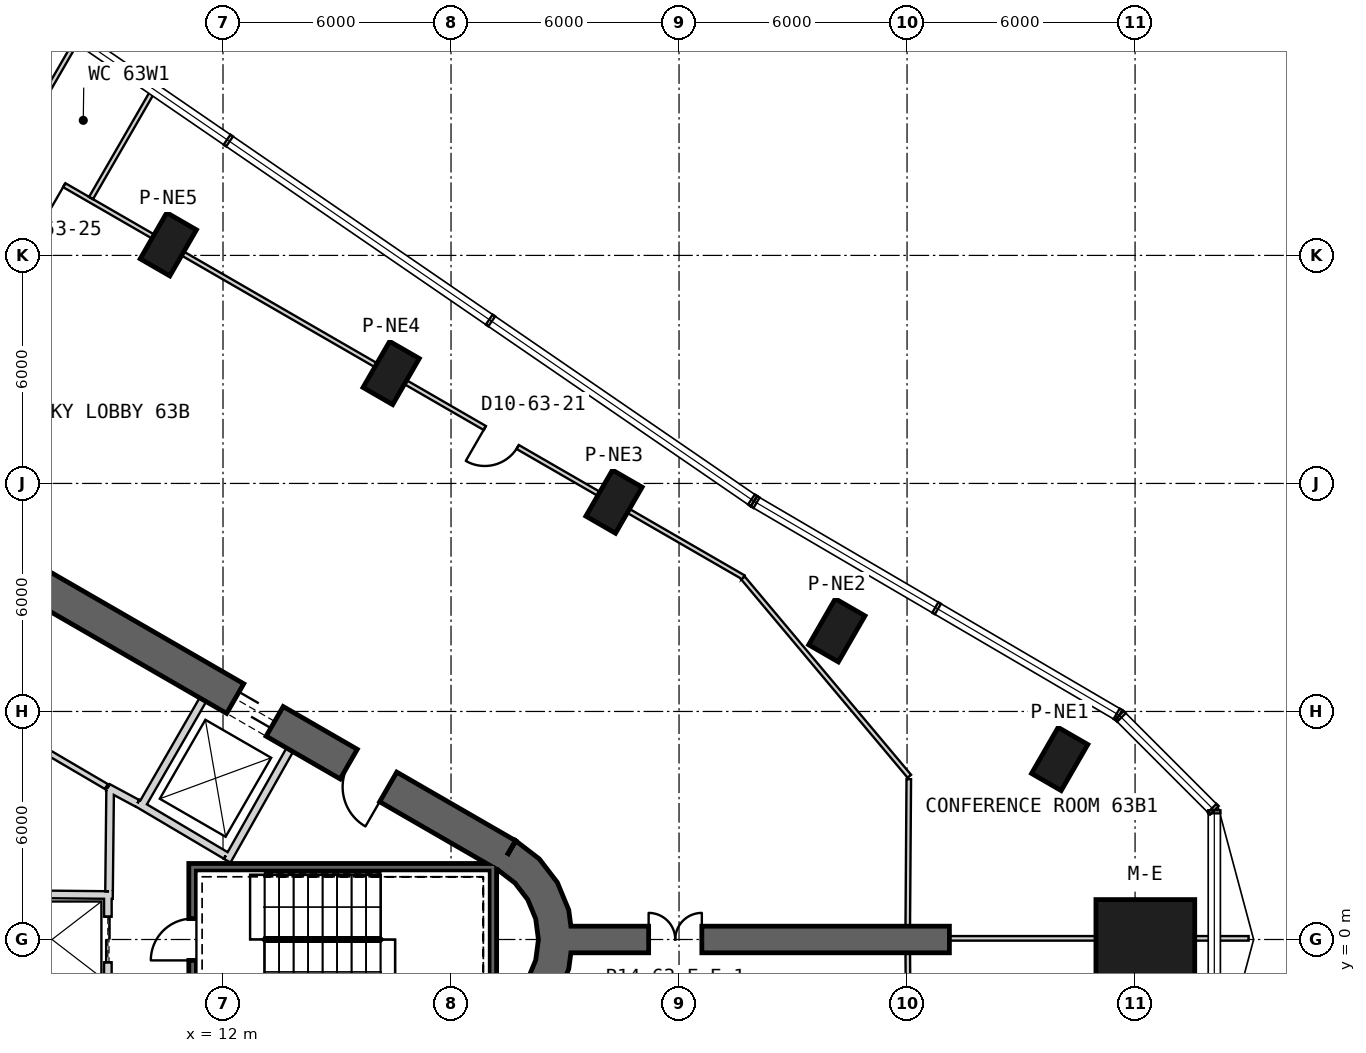
"""IFC4 building model, lengths in metres.
Left out: names, types, materials, properties, quantities, classifications, styles, units other than length and angle.
Written with IfcOpenShell. Run it as: python <this file> out.ifc"""

import sys

from ifc_helpers import new_model, si_unit, direction, frame, frame_2d, origin, origin_2d, place, context, subcontext, project, spatial, polyline, rectangle, outline, extrude, element, fill, save


model = new_model("IFC4")
c1 = context("Model", 3, precision=1e-05, world=origin(), true_north=direction((0.0, 1.0)))
c2 = subcontext(c1, "Body", "Model", "MODEL_VIEW")
j1 = project(units=[si_unit("LENGTHUNIT", "METRE"), si_unit("PLANEANGLEUNIT", "RADIAN")], contexts=[c1])
p1 = place(None, origin())
s1 = spatial("IfcSite", under=j1, at=p1, CompositionType="ELEMENT")
p2 = place(p1, origin())
s2 = spatial("IfcBuilding", under=s1, at=p2, CompositionType="ELEMENT")
p3 = place(p2, frame((0.0, 0.0, 277.2)))
s3 = spatial("IfcBuildingStorey", under=s2, at=p3, CompositionType="ELEMENT", Elevation=277.2)
p4 = place(p3, frame((36.27, 0.0, 0.0), z_axis=(0.0, 0.0, 1.0), x_axis=(1.0, 0.0, 0.0)))
e1 = element("IfcColumn", 1, at=p4, inside=s3, PredefinedType="COLUMN", context=c2, shape_type="SweptSolid", body=[
    extrude(rectangle(XDim=2.6, YDim=2.1, at=origin_2d()), origin(), (0.0, 0.0, 1.0), 6.5),
])
for number, where, z_axis, x_axis in (
    (2, (34.016, 4.75, 0.0), (0.0, 0.0, 1.0), (0.5, 0.866, 0.0)),
    (3, (28.152, 8.135, 0.0), (0.0, 0.0, 1.0), (0.5, 0.866, 0.0)),
    (4, (22.288, 11.521, 0.0), (0.0, 0.0, 1.0), (0.5, 0.866, 0.0)),
    (5, (16.425, 14.906, 0.0), (0.0, 0.0, 1.0), (0.5, 0.866, 0.0)),
    (6, (10.561, 18.292, 0.0), (0.0, 0.0, 1.0), (0.5, 0.866, 0.0)),
):
    element("IfcColumn", number, at=place(p3, frame(where, z_axis=z_axis, x_axis=x_axis)), inside=s3, PredefinedType="COLUMN", context=c2, shape_type="SweptSolid", body=[
        extrude(rectangle(XDim=1.4, YDim=0.9, at=origin_2d()), origin(), (0.0, 0.0, 1.0), 6.5),
    ])
p5 = place(p3, frame((19.475, 2.208, 0.0), z_axis=(0.0, 0.0, 1.0), x_axis=(-0.866028369851, 0.499994862586, 0.0)))
e7 = element("IfcWall", 7, at=p5, inside=s3, PredefinedType="SHEAR", context=c2, shape_type="SweptSolid", body=[
    extrude(rectangle(XDim=31.523, YDim=0.9, at=frame_2d((15.762, 0.0))), origin(), (0.0, 0.0, 1.0), 6.5),
])
p6 = place(p5, frame((7.062, 0.0, 0.0)))
e8 = element("IfcOpeningElement", 8, at=p6, cuts=e7, PredefinedType="OPENING", context=c2, shape_type="SweptSolid", body=[
    extrude(rectangle(XDim=1.2, YDim=2.4, at=frame_2d((0.6, 1.2))), frame((0.0, 0.46, 0.0), z_axis=(0.0, -1.0, 0.0), x_axis=(1.0, 0.0, 0.0)), (0.0, 0.0, 1.0), 0.92),
])
p7 = place(p5, frame((3.612, 0.0, 0.0)))
e9 = element("IfcOpeningElement", 9, at=p7, cuts=e7, PredefinedType="OPENING", context=c2, shape_type="SweptSolid", body=[
    extrude(rectangle(XDim=1.2, YDim=2.4, at=frame_2d((0.6, 1.2))), frame((0.0, 0.46, 0.0), z_axis=(0.0, -1.0, 0.0), x_axis=(1.0, 0.0, 0.0)), (0.0, 0.0, 1.0), 0.92),
])
p8 = place(p5, frame((26.712, 0.0, 0.0)))
e10 = element("IfcOpeningElement", 10, at=p8, cuts=e7, PredefinedType="OPENING", context=c2, shape_type="SweptSolid", body=[
    extrude(rectangle(XDim=1.2, YDim=2.4, at=frame_2d((0.6, 1.2))), frame((0.0, 0.46, 0.0), z_axis=(0.0, -1.0, 0.0), x_axis=(1.0, 0.0, 0.0)), (0.0, 0.0, 1.0), 0.92),
])
p9 = place(p3, origin())
e11 = element("IfcWall", 11, at=p9, inside=s3, PredefinedType="SHEAR", context=c2, shape_type="SweptSolid", body=[
    extrude(outline(polyline([(19.7, -2.598), (20.321, -2.121), (20.798, -1.5), (21.098, -0.777), (21.2, 0.0), (21.098, 0.777), (20.798, 1.5), (20.321, 2.121), (19.7, 2.598), (19.25, 1.819), (19.685, 1.485), (20.019, 1.05), (20.229, 0.543), (20.3, 0.0), (20.229, -0.543), (20.019, -1.05), (19.685, -1.485), (19.25, -1.819), (19.7, -2.598)])), origin(), (0.0, 0.0, 1.0), 6.5),
])
p10 = place(p3, frame((21.15, 0.0, 0.0), z_axis=(0.0, 0.0, 1.0), x_axis=(1.0, 0.0, 0.0)))
e12 = element("IfcWall", 12, at=p10, inside=s3, PredefinedType="SHEAR", context=c2, shape_type="SweptSolid", body=[
    extrude(rectangle(XDim=9.965, YDim=0.7, at=frame_2d((4.982, 0.0))), origin(), (0.0, 0.0, 1.0), 6.5),
])
p11 = place(p10, frame((2.05, 0.0, 0.0)))
e13 = element("IfcOpeningElement", 13, at=p11, cuts=e12, PredefinedType="OPENING", context=c2, shape_type="SweptSolid", body=[
    extrude(rectangle(XDim=1.4, YDim=2.4, at=frame_2d((0.7, 1.2))), frame((0.0, 0.36, 0.0), z_axis=(0.0, -1.0, 0.0), x_axis=(1.0, 0.0, 0.0)), (0.0, 0.0, 1.0), 0.72),
])
p12 = place(p3, frame((9.847, 3.495, 0.0), z_axis=(0.0, 0.0, 1.0), x_axis=(0.499984717929, 0.866034226713, 0.0)))
e14 = element("IfcWall", 14, at=p12, inside=s3, PredefinedType="PLUMBINGWALL", context=c2, shape_type="SweptSolid", body=[
    extrude(rectangle(XDim=3.25, YDim=0.2, at=frame_2d((1.625, 0.0))), origin(), (0.0, 0.0, 1.0), 6.1),
])
p13 = place(p3, frame((12.11, 2.073, 0.0), z_axis=(0.0, 0.0, 1.0), x_axis=(0.49196600604, 0.870614408852, 0.0)))
e15 = element("IfcWall", 15, at=p13, inside=s3, PredefinedType="PLUMBINGWALL", context=c2, shape_type="SweptSolid", body=[
    extrude(rectangle(XDim=3.35, YDim=0.2, at=frame_2d((1.675, 0.0))), origin(), (0.0, 0.0, 1.0), 6.1),
])
p14 = place(p3, frame((12.073, 2.211, 0.0), z_axis=(0.0, 0.0, 1.0), x_axis=(-0.860414880418, 0.509594185166, 0.0)))
e16 = element("IfcWall", 16, at=p14, inside=s3, PredefinedType="PLUMBINGWALL", context=c2, shape_type="SweptSolid", body=[
    extrude(rectangle(XDim=2.7, YDim=0.2, at=frame_2d((1.35, 0.0))), origin(), (0.0, 0.0, 1.0), 6.1),
])
p15 = place(p3, frame((19.2, 1.9, -0.35), z_axis=(0.0, 0.0, 1.0), x_axis=(-1.0, 0.0, 0.0)))
e17 = element("IfcWall", 17, at=p15, inside=s3, PredefinedType="SHEAR", context=c2, shape_type="SweptSolid", body=[
    extrude(rectangle(XDim=8.1, YDim=0.2, at=frame_2d((4.05, 0.0))), origin(), (0.0, 0.0, 1.0), 6.45),
])
p16 = place(p3, frame((19.1, -2.0, -0.35), z_axis=(0.0, 0.0, 1.0), x_axis=(0.0, 1.0, 0.0)))
e18 = element("IfcWall", 18, at=p16, inside=s3, PredefinedType="SHEAR", context=c2, shape_type="SweptSolid", body=[
    extrude(rectangle(XDim=3.8, YDim=0.2, at=frame_2d((1.9, 0.0))), origin(), (0.0, 0.0, 1.0), 6.45),
])
p17 = place(p3, frame((11.2, -1.8, -0.35), z_axis=(0.0, 0.0, 1.0), x_axis=(0.0, 1.0, 0.0)))
e19 = element("IfcWall", 19, at=p17, inside=s3, PredefinedType="SHEAR", context=c2, shape_type="SweptSolid", body=[
    extrude(rectangle(XDim=3.6, YDim=0.2, at=frame_2d((1.8, 0.0))), origin(), (0.0, 0.0, 1.0), 6.45),
])
p18 = place(p17, frame((1.25, 0.0, 0.35)))
e20 = element("IfcOpeningElement", 20, at=p18, cuts=e19, PredefinedType="OPENING", context=c2, shape_type="SweptSolid", body=[
    extrude(rectangle(XDim=1.1, YDim=2.1, at=frame_2d((0.55, 1.05))), frame((0.0, 0.11, 0.0), z_axis=(0.0, -1.0, 0.0), x_axis=(1.0, 0.0, 0.0)), (0.0, 0.0, 1.0), 0.22),
])
p19 = place(p3, frame((8.97, 1.2, 0.0), z_axis=(0.0, 0.0, 1.0), x_axis=(0.0, -1.0, 0.0)))
e21 = element("IfcWall", 21, at=p19, inside=s3, PredefinedType="PLUMBINGWALL", context=c2, shape_type="SweptSolid", body=[
    extrude(rectangle(XDim=2.4, YDim=0.2, at=frame_2d((1.2, 0.0))), origin(), (0.0, 0.0, 1.0), 6.1),
])
p20 = place(p19, frame((0.6, 0.0, 0.0)))
e22 = element("IfcOpeningElement", 22, at=p20, cuts=e21, PredefinedType="OPENING", context=c2, shape_type="SweptSolid", body=[
    extrude(rectangle(XDim=1.2, YDim=2.4, at=frame_2d((0.6, 1.2))), frame((0.0, 0.11, 0.0), z_axis=(0.0, -1.0, 0.0), x_axis=(1.0, 0.0, 0.0)), (0.0, 0.0, 1.0), 0.22),
])
p21 = place(p3, frame((6.0, 1.2, 0.0), z_axis=(0.0, 0.0, 1.0), x_axis=(0.999949988, -0.010001074852, 0.0)))
e23 = element("IfcWall", 23, at=p21, inside=s3, PredefinedType="PLUMBINGWALL", context=c2, shape_type="SweptSolid", body=[
    extrude(rectangle(XDim=3.1, YDim=0.2, at=frame_2d((1.55, 0.0))), origin(), (0.0, 0.0, 1.0), 6.1),
])
p22 = place(p3, frame((8.974, 3.999, 0.0), z_axis=(0.0, 0.0, 1.0), x_axis=(0.880917147855, -0.473270513147, 0.0)))
e24 = element("IfcWall", 24, at=p22, inside=s3, PredefinedType="PARTITIONING", context=c2, shape_type="SweptSolid", body=[
    extrude(rectangle(XDim=0.878, YDim=0.2, at=frame_2d((0.439, 0.0))), origin(), (0.0, 0.0, 1.0), 6.1),
])
p23 = place(p3, frame((8.931, 4.025, 0.0), z_axis=(0.0, 0.0, 1.0), x_axis=(-0.862666884027, 0.505772525157, 0.0)))
e25 = element("IfcWall", 25, at=p23, inside=s3, PredefinedType="PLUMBINGWALL", context=c2, shape_type="SweptSolid", body=[
    extrude(rectangle(XDim=4.372, YDim=0.15, at=frame_2d((2.186, 0.0))), origin(), (0.0, 0.0, 1.0), 6.1),
])
p24 = place(p3, frame((9.001, 1.27, 0.0), z_axis=(0.0, 0.0, 1.0), x_axis=(0.01074821465, 0.999942236273, 0.0)))
e26 = element("IfcWall", 26, at=p24, inside=s3, PredefinedType="PARTITIONING", context=c2, shape_type="SweptSolid", body=[
    extrude(rectangle(XDim=2.726, YDim=0.2, at=frame_2d((1.363, 0.0))), origin(), (0.0, 0.0, 1.0), 6.1),
])
p25 = place(p3, frame((25.695, 9.529, 0.0), z_axis=(0.0, 0.0, 1.0), x_axis=(-0.866021729263, 0.500006364403, 0.0)))
e27 = element("IfcWall", 27, at=p25, inside=s3, PredefinedType="PARTITIONING", context=c2, shape_type="SweptSolid", body=[
    extrude(rectangle(XDim=22.257, YDim=0.12, at=frame_2d((11.128, 0.0))), origin(), (0.0, 0.0, 1.0), 6.1),
])
p26 = place(p25, frame((6.86, 0.0, 0.0)))
e28 = element("IfcOpeningElement", 28, at=p26, cuts=e27, PredefinedType="OPENING", context=c2, shape_type="SweptSolid", body=[
    extrude(rectangle(XDim=1.0, YDim=2.1, at=frame_2d((0.5, 1.05))), frame((0.0, 0.07, 0.0), z_axis=(0.0, -1.0, 0.0), x_axis=(1.0, 0.0, 0.0)), (0.0, 0.0, 1.0), 0.14),
])
p27 = place(p25, frame((20.637, 0.0, 0.0)))
e29 = element("IfcOpeningElement", 29, at=p27, cuts=e27, PredefinedType="OPENING", context=c2, shape_type="SweptSolid", body=[
    extrude(rectangle(XDim=0.9, YDim=2.1, at=frame_2d((0.45, 1.05))), frame((0.0, 0.07, 0.0), z_axis=(0.0, -1.0, 0.0), x_axis=(1.0, 0.0, 0.0)), (0.0, 0.0, 1.0), 0.14),
])
p28 = place(p3, frame((30.06, 4.295, 0.0), z_axis=(0.0, 0.0, 1.0), x_axis=(-0.642771739086, 0.766057759854, 0.0)))
e30 = element("IfcWall", 30, at=p28, inside=s3, PredefinedType="PARTITIONING", context=c2, shape_type="SweptSolid", body=[
    extrude(rectangle(XDim=6.812, YDim=0.12, at=frame_2d((3.406, 0.0))), origin(), (0.0, 0.0, 1.0), 5.28),
])
p29 = place(p3, frame((30.019, 0.35, 0.0), z_axis=(0.0, 0.0, 1.0), x_axis=(0.00700430852, 0.99997546953, 0.0)))
e31 = element("IfcWall", 31, at=p29, inside=s3, PredefinedType="PARTITIONING", context=c2, shape_type="SweptSolid", body=[
    extrude(rectangle(XDim=3.869, YDim=0.12, at=frame_2d((1.935, 0.0))), origin(), (0.0, 0.0, 1.0), 5.28),
])
p30 = place(p3, frame((31.115, 0.03, 0.0), z_axis=(0.0, 0.0, 1.0), x_axis=(1.0, 0.0, 0.0)))
e32 = element("IfcWall", 32, at=p30, inside=s3, PredefinedType="PARTITIONING", context=c2, shape_type="SweptSolid", body=[
    extrude(rectangle(XDim=3.856, YDim=0.12, at=frame_2d((1.928, 0.0))), origin(), (0.0, 0.0, 1.0), 5.67),
])
p31 = place(p3, frame((37.57, 0.03, 0.0), z_axis=(0.0, 0.0, 1.0), x_axis=(1.0, 0.0, 0.0)))
e33 = element("IfcWall", 33, at=p31, inside=s3, PredefinedType="PARTITIONING", context=c2, shape_type="SweptSolid", body=[
    extrude(rectangle(XDim=1.418, YDim=0.12, at=frame_2d((0.709, 0.0))), origin(), (0.0, 0.0, 1.0), 6.1),
])
p32 = place(p3, frame((10.178, 22.369, 0.0), z_axis=(0.0, 0.0, 1.0), x_axis=(-0.49998922161, -0.866031626602, 0.0)))
e34 = element("IfcWall", 34, at=p32, inside=s3, PredefinedType="PARTITIONING", context=c2, shape_type="SweptSolid", body=[
    extrude(rectangle(XDim=3.301, YDim=0.12, at=frame_2d((1.65, 0.0))), origin(), (0.0, 0.0, 1.0), 6.1),
])
p33 = place(p3, frame((30.046, -4.334, 0.0), z_axis=(0.0, 0.0, 1.0), x_axis=(-0.006986407906, 0.999975594754, 0.0)))
e35 = element("IfcWall", 35, at=p33, inside=s3, PredefinedType="PARTITIONING", context=c2, shape_type="SweptSolid", body=[
    extrude(rectangle(XDim=3.984, YDim=0.12, at=frame_2d((1.992, 0.0))), origin(), (0.0, 0.0, 1.0), 5.28),
])
p34 = place(p3, frame((8.194, 23.73, 0.0), z_axis=(0.0, 0.0, 1.0), x_axis=(-0.500001179632, -0.866024722723, 0.0)))
e36 = element("IfcWall", 36, at=p34, inside=s3, PredefinedType="PARTITIONING", context=c2, shape_type="SweptSolid", body=[
    extrude(rectangle(XDim=3.488, YDim=0.12, at=frame_2d((1.744, 0.0))), origin(), (0.0, 0.0, 1.0), 6.1),
])
p35 = place(p18, origin())
e37 = element("IfcDoor", 37, at=p35, inside=s3, OperationType="SINGLE_SWING_LEFT", PredefinedType="USERDEFINED", context=c2, shape_type="SweptSolid", body=[
    extrude(rectangle(XDim=1.1, YDim=2.1, at=frame_2d((0.55, 1.05))), frame((0.0, 0.025, 0.0), z_axis=(0.0, -1.0, 0.0), x_axis=(1.0, 0.0, 0.0)), (0.0, 0.0, 1.0), 0.05),
])
fill(e20, e37)
p36 = place(p20, origin())
e38 = element("IfcDoor", 38, at=p36, inside=s3, OperationType="SLIDING_TO_LEFT", PredefinedType="USERDEFINED", context=c2, shape_type="SweptSolid", body=[
    extrude(rectangle(XDim=1.2, YDim=2.4, at=frame_2d((0.6, 1.2))), frame((0.0, 0.025, 0.0), z_axis=(0.0, -1.0, 0.0), x_axis=(1.0, 0.0, 0.0)), (0.0, 0.0, 1.0), 0.05),
])
fill(e22, e38)
p37 = place(p26, origin())
e39 = element("IfcDoor", 39, at=p37, inside=s3, OperationType="SINGLE_SWING_RIGHT", PredefinedType="NOTDEFINED", context=c2, shape_type="SweptSolid", body=[
    extrude(rectangle(XDim=1.0, YDim=2.1, at=frame_2d((0.5, 1.05))), frame((0.0, 0.025, 0.0), z_axis=(0.0, -1.0, 0.0), x_axis=(1.0, 0.0, 0.0)), (0.0, 0.0, 1.0), 0.05),
])
fill(e28, e39)
p38 = place(p27, origin())
e40 = element("IfcDoor", 40, at=p38, inside=s3, OperationType="SINGLE_SWING_LEFT", PredefinedType="NOTDEFINED", context=c2, shape_type="SweptSolid", body=[
    extrude(rectangle(XDim=0.9, YDim=2.1, at=frame_2d((0.45, 1.05))), frame((0.0, 0.025, 0.0), z_axis=(0.0, -1.0, 0.0), x_axis=(1.0, 0.0, 0.0)), (0.0, 0.0, 1.0), 0.05),
])
fill(e29, e40)
p39 = place(p6, origin())
e41 = element("IfcDoor", 41, at=p39, inside=s3, OperationType="SLIDING_TO_LEFT", PredefinedType="USERDEFINED", context=c2, shape_type="SweptSolid", body=[
    extrude(rectangle(XDim=1.2, YDim=2.4, at=frame_2d((0.6, 1.2))), frame((0.0, 0.025, 0.0), z_axis=(0.0, -1.0, 0.0), x_axis=(1.0, 0.0, 0.0)), (0.0, 0.0, 1.0), 0.05),
])
fill(e8, e41)
p40 = place(p7, origin())
e42 = element("IfcDoor", 42, at=p40, inside=s3, OperationType="SINGLE_SWING_LEFT", PredefinedType="USERDEFINED", context=c2, shape_type="SweptSolid", body=[
    extrude(rectangle(XDim=1.2, YDim=2.4, at=frame_2d((0.6, 1.2))), frame((0.0, 0.025, 0.0), z_axis=(0.0, -1.0, 0.0), x_axis=(1.0, 0.0, 0.0)), (0.0, 0.0, 1.0), 0.05),
])
fill(e9, e42)
p41 = place(p11, origin())
e43 = element("IfcDoor", 43, at=p41, inside=s3, OperationType="DOUBLE_DOOR_SINGLE_SWING", PredefinedType="NOTDEFINED", context=c2, shape_type="SweptSolid", body=[
    extrude(rectangle(XDim=1.4, YDim=2.4, at=frame_2d((0.7, 1.2))), frame((0.0, 0.025, 0.0), z_axis=(0.0, -1.0, 0.0), x_axis=(1.0, 0.0, 0.0)), (0.0, 0.0, 1.0), 0.05),
])
fill(e13, e43)
save(model, sys.argv[1])
